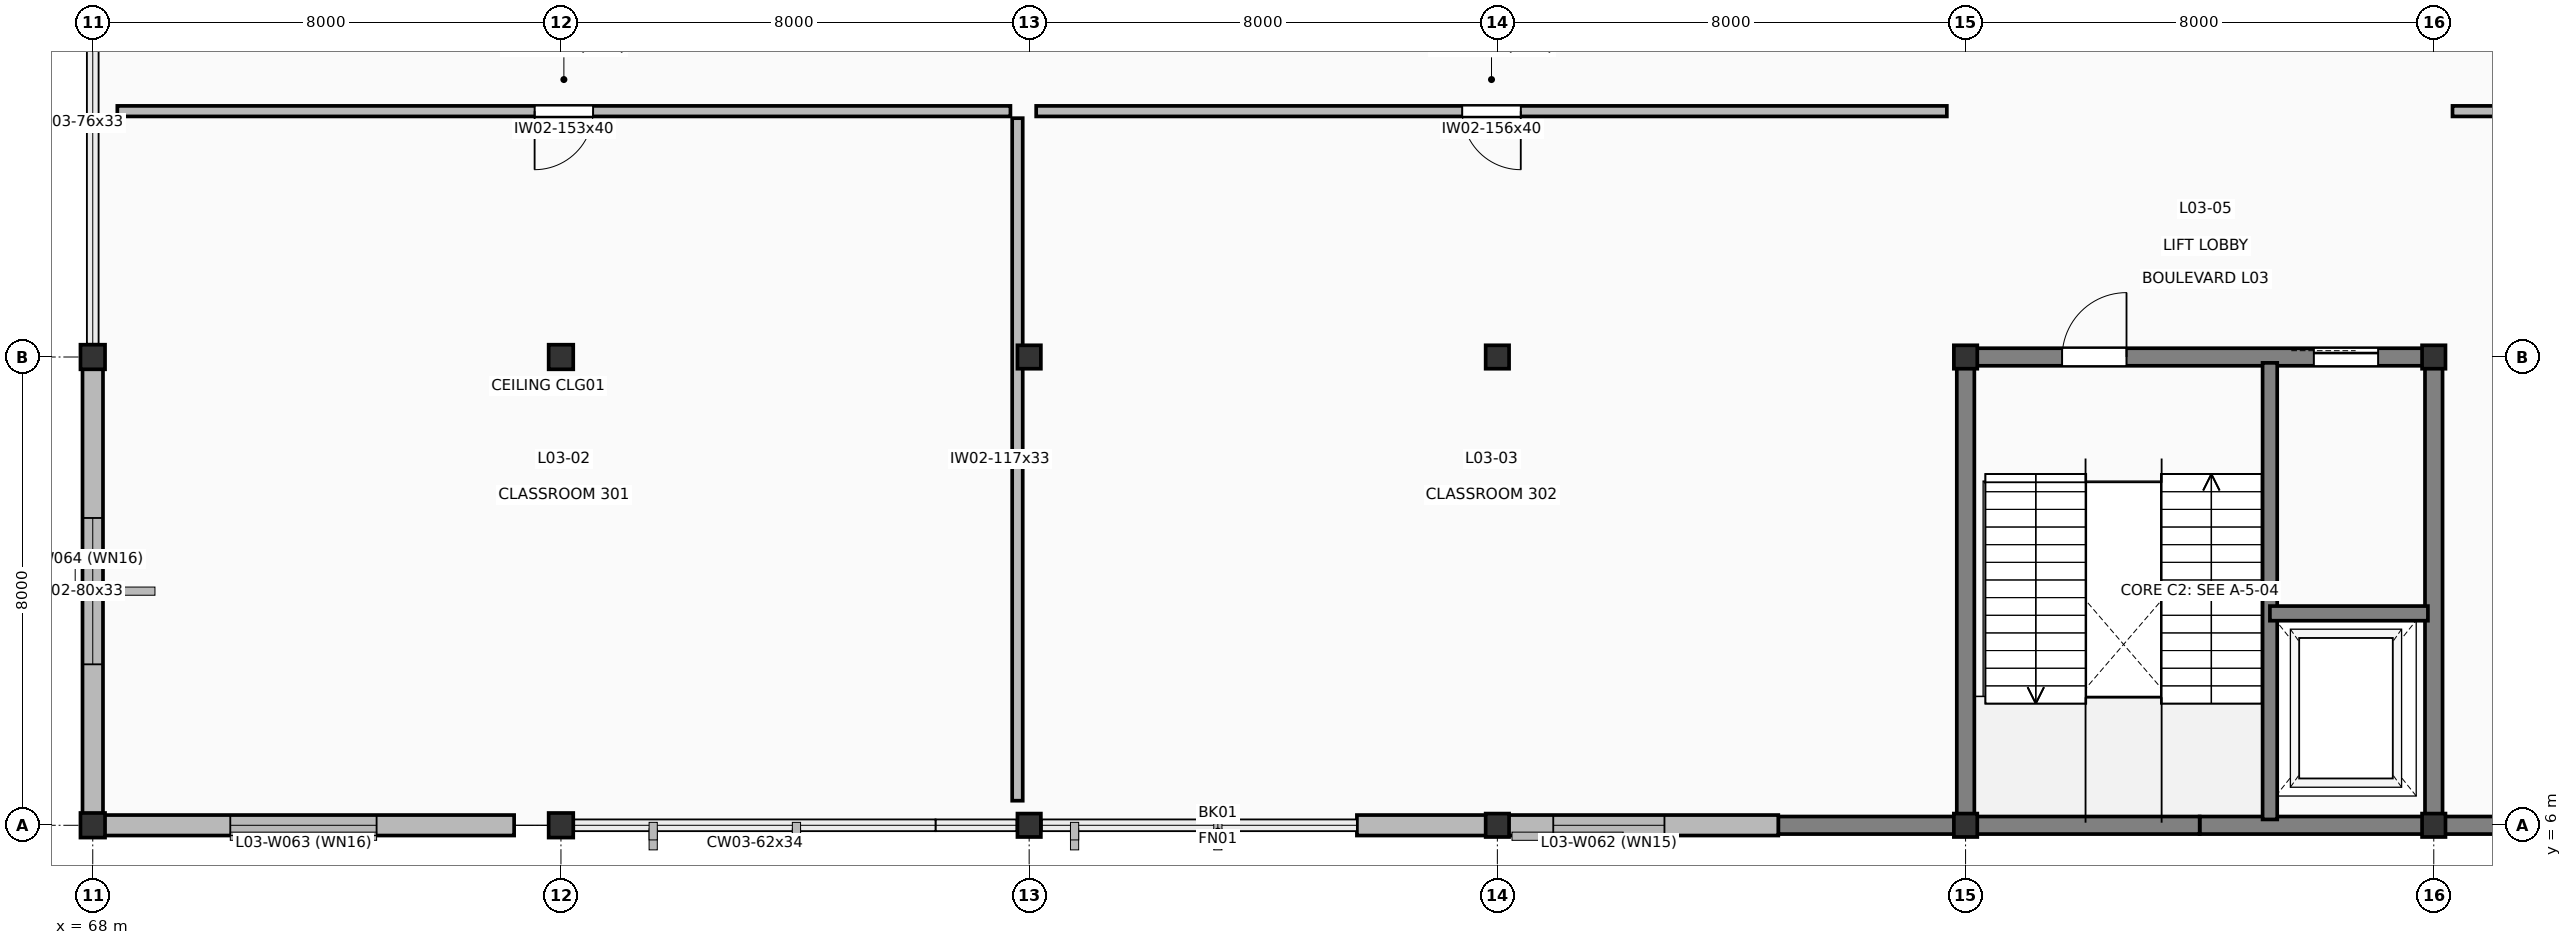
"""IFC4 building model, lengths in metres.
Left out: names, types, materials, properties, quantities, classifications, styles, units other than length and angle.
Written with IfcOpenShell. Run it as: python <this file> out.ifc"""

import sys

from ifc_helpers import new_model, si_unit, direction, frame, frame_2d, origin, origin_2d, place, context, subcontext, project, spatial, rectangle, extrude, element, fill, save


model = new_model("IFC4")
c1 = context("Model", 3, precision=1e-05, world=origin(), true_north=direction((0.0, 1.0)))
c2 = subcontext(c1, "Body", "Model", "MODEL_VIEW")
j1 = project(units=[si_unit("LENGTHUNIT", "METRE"), si_unit("PLANEANGLEUNIT", "RADIAN")], contexts=[c1])
p1 = place(None, origin())
s1 = spatial("IfcSite", under=j1, at=p1, CompositionType="ELEMENT")
p2 = place(p1, origin())
s2 = spatial("IfcBuilding", under=s1, at=p2, CompositionType="ELEMENT")
p3 = place(p2, frame((0.0, 0.0, 13.8)))
s3 = spatial("IfcBuildingStorey", under=s2, at=p3, CompositionType="ELEMENT", Elevation=13.8)
for number, where, z_axis, x_axis in (
    (1, (68.0, 6.0, 0.0), (0.0, 0.0, 1.0), (1.0, 0.0, 0.0)),
    (2, (68.0, 14.0, 0.0), (0.0, 0.0, 1.0), (1.0, 0.0, 0.0)),
    (3, (76.0, 6.0, 0.0), (0.0, 0.0, 1.0), (1.0, 0.0, 0.0)),
    (4, (76.0, 14.0, 0.0), (0.0, 0.0, 1.0), (1.0, 0.0, 0.0)),
):
    element("IfcColumn", number, at=place(p3, frame(where, z_axis=z_axis, x_axis=x_axis)), inside=s3, PredefinedType="COLUMN", context=c2, shape_type="SweptSolid", body=[
        extrude(rectangle(XDim=0.42, YDim=0.42, at=origin_2d()), origin(), (0.0, 0.0, 1.0), 4.2),
    ])
for number, where, z_axis, x_axis in (
    (5, (84.0, 6.0, 0.0), (0.0, 0.0, 1.0), (1.0, 0.0, 0.0)),
    (6, (84.0, 14.0, 0.0), (0.0, 0.0, 1.0), (1.0, 0.0, 0.0)),
    (7, (92.0, 6.0, 0.0), (0.0, 0.0, 1.0), (1.0, 0.0, 0.0)),
    (8, (92.0, 14.0, 0.0), (0.0, 0.0, 1.0), (1.0, 0.0, 0.0)),
    (9, (100.0, 6.0, 0.0), (0.0, 0.0, 1.0), (1.0, 0.0, 0.0)),
    (10, (100.0, 14.0, 0.0), (0.0, 0.0, 1.0), (1.0, 0.0, 0.0)),
    (11, (108.0, 6.0, 0.0), (0.0, 0.0, 1.0), (1.0, 0.0, 0.0)),
    (12, (108.0, 14.0, 0.0), (0.0, 0.0, 1.0), (1.0, 0.0, 0.0)),
):
    element("IfcColumn", number, at=place(p3, frame(where, z_axis=z_axis, x_axis=x_axis)), inside=s3, PredefinedType="COLUMN", context=c2, shape_type="SweptSolid", body=[
        extrude(rectangle(XDim=0.4, YDim=0.4, at=origin_2d()), origin(), (0.0, 0.0, 1.0), 4.2),
    ])
for number, where, z_axis, x_axis in (
    (13, (111.2, 6.0, 0.0), (0.0, 0.0, 1.0), (-1.0, 0.0, 0.0)),
    (14, (104.0, 6.0, 0.0), (0.0, 0.0, 1.0), (-1.0, 0.0, 0.0)),
):
    element("IfcWall", number, at=place(p3, frame(where, z_axis=z_axis, x_axis=x_axis)), inside=s3, PredefinedType="SOLIDWALL", context=c2, shape_type="SweptSolid", body=[
        extrude(rectangle(XDim=7.2, YDim=0.3, at=frame_2d((3.6, 0.0))), origin(), (0.0, 0.0, 1.0), 4.2),
    ])
p4 = place(p3, frame((96.8, 6.0, 0.0), z_axis=(0.0, 0.0, 1.0), x_axis=(-1.0, 0.0, 0.0)))
e15 = element("IfcWall", 15, at=p4, inside=s3, PredefinedType="SOLIDWALL", context=c2, shape_type="SweptSolid", body=[
    extrude(rectangle(XDim=7.2, YDim=0.35, at=frame_2d((3.6, 0.0))), origin(), (0.0, 0.0, 1.0), 3.445),
])
p5 = place(p4, frame((1.945, 0.0, 0.9)))
e16 = element("IfcOpeningElement", 16, at=p5, cuts=e15, PredefinedType="OPENING", context=c2, shape_type="SweptSolid", body=[
    extrude(rectangle(XDim=1.9, YDim=2.1, at=frame_2d((0.95, 1.05))), frame((0.0, 0.185, 0.0), z_axis=(0.0, -1.0, 0.0), x_axis=(1.0, 0.0, 0.0)), (0.0, 0.0, 1.0), 0.37),
])
p6 = place(p3, frame((75.2, 6.0, 0.0), z_axis=(0.0, 0.0, 1.0), x_axis=(-1.0, 0.0, 0.0)))
e17 = element("IfcWall", 17, at=p6, inside=s3, PredefinedType="SOLIDWALL", context=c2, shape_type="SweptSolid", body=[
    extrude(rectangle(XDim=7.2, YDim=0.35, at=frame_2d((3.6, 0.0))), origin(), (0.0, 0.0, 1.0), 3.445),
])
p7 = place(p6, frame((2.35, 0.0, 1.6)))
e18 = element("IfcOpeningElement", 18, at=p7, cuts=e17, PredefinedType="OPENING", context=c2, shape_type="SweptSolid", body=[
    extrude(rectangle(XDim=2.5, YDim=1.3, at=frame_2d((1.25, 0.65))), frame((0.0, 0.185, 0.0), z_axis=(0.0, -1.0, 0.0), x_axis=(1.0, 0.0, 0.0)), (0.0, 0.0, 1.0), 0.37),
])
p8 = place(p3, frame((68.0, 6.0, 0.0), z_axis=(0.0, 0.0, 1.0), x_axis=(0.0, 1.0, 0.0)))
e19 = element("IfcWall", 19, at=p8, inside=s3, PredefinedType="SOLIDWALL", context=c2, shape_type="SweptSolid", body=[
    extrude(rectangle(XDim=8.0, YDim=0.35, at=frame_2d((4.0, 0.0))), origin(), (0.0, 0.0, 1.0), 3.325),
])
p9 = place(p8, frame((2.75, 0.0, 1.6)))
e20 = element("IfcOpeningElement", 20, at=p9, cuts=e19, PredefinedType="OPENING", context=c2, shape_type="SweptSolid", body=[
    extrude(rectangle(XDim=2.5, YDim=1.3, at=frame_2d((1.25, 0.65))), frame((0.0, 0.185, 0.0), z_axis=(0.0, -1.0, 0.0), x_axis=(1.0, 0.0, 0.0)), (0.0, 0.0, 1.0), 0.37),
])
p10 = place(p3, frame((100.0, 6.0, 0.0), z_axis=(0.0, 0.0, 1.0), x_axis=(0.0, 1.0, 0.0)))
e21 = element("IfcWall", 21, at=p10, inside=s3, PredefinedType="SHEAR", context=c2, shape_type="SweptSolid", body=[
    extrude(rectangle(XDim=8.0, YDim=0.3, at=frame_2d((4.0, 0.0))), origin(), (0.0, 0.0, 1.0), 4.2),
])
p11 = place(p3, frame((100.0, 14.0, 0.0), z_axis=(0.0, 0.0, 1.0), x_axis=(1.0, 0.0, 0.0)))
e22 = element("IfcWall", 22, at=p11, inside=s3, PredefinedType="SHEAR", context=c2, shape_type="SweptSolid", body=[
    extrude(rectangle(XDim=8.0, YDim=0.3, at=frame_2d((4.0, 0.0))), origin(), (0.0, 0.0, 1.0), 4.2),
])
p12 = place(p11, frame((1.65, 0.0, 0.0)))
e23 = element("IfcOpeningElement", 23, at=p12, cuts=e22, PredefinedType="OPENING", context=c2, shape_type="SweptSolid", body=[
    extrude(rectangle(XDim=1.1, YDim=2.2, at=frame_2d((0.55, 1.1))), frame((0.0, 0.16, 0.0), z_axis=(0.0, -1.0, 0.0), x_axis=(1.0, 0.0, 0.0)), (0.0, 0.0, 1.0), 0.32),
])
p13 = place(p11, frame((5.95, 0.0, 0.0)))
e24 = element("IfcOpeningElement", 24, at=p13, cuts=e22, PredefinedType="OPENING", context=c2, shape_type="SweptSolid", body=[
    extrude(rectangle(XDim=1.1, YDim=2.2, at=frame_2d((0.55, 1.1))), frame((0.0, 0.16, 0.0), z_axis=(0.0, -1.0, 0.0), x_axis=(1.0, 0.0, 0.0)), (0.0, 0.0, 1.0), 0.32),
])
p14 = place(p3, frame((108.0, 14.0, 0.0), z_axis=(0.0, 0.0, 1.0), x_axis=(0.0, -1.0, 0.0)))
e25 = element("IfcWall", 25, at=p14, inside=s3, PredefinedType="SHEAR", context=c2, shape_type="SweptSolid", body=[
    extrude(rectangle(XDim=8.0, YDim=0.3, at=frame_2d((4.0, 0.0))), origin(), (0.0, 0.0, 1.0), 4.2),
])
p15 = place(p3, frame((105.2, 6.1, 0.0), z_axis=(0.0, 0.0, 1.0), x_axis=(0.0, 1.0, 0.0)))
e26 = element("IfcWall", 26, at=p15, inside=s3, PredefinedType="SHEAR", context=c2, shape_type="SweptSolid", body=[
    extrude(rectangle(XDim=7.8, YDim=0.25, at=frame_2d((3.9, 0.0))), origin(), (0.0, 0.0, 1.0), 4.2),
])
p16 = place(p3, frame((105.2, 9.62, 0.0), z_axis=(0.0, 0.0, 1.0), x_axis=(1.0, 0.0, 0.0)))
e27 = element("IfcWall", 27, at=p16, inside=s3, PredefinedType="SHEAR", context=c2, shape_type="SweptSolid", body=[
    extrude(rectangle(XDim=2.7, YDim=0.25, at=frame_2d((1.35, 0.0))), origin(), (0.0, 0.0, 1.0), 4.2),
])
p17 = place(p3, frame((83.68, 18.2, 0.0), z_axis=(0.0, 0.0, 1.0), x_axis=(-1.0, 0.0, 0.0)))
e28 = element("IfcWall", 28, at=p17, inside=s3, PredefinedType="PARTITIONING", context=c2, shape_type="SweptSolid", body=[
    extrude(rectangle(XDim=15.26, YDim=0.18, at=frame_2d((7.63, 0.0))), origin(), (0.0, 0.0, 1.0), 3.98),
])
p18 = place(p17, frame((7.13, 0.0, 0.0)))
e29 = element("IfcOpeningElement", 29, at=p18, cuts=e28, PredefinedType="OPENING", context=c2, shape_type="SweptSolid", body=[
    extrude(rectangle(XDim=1.0, YDim=2.15, at=frame_2d((0.5, 1.075))), frame((0.0, 0.1, 0.0), z_axis=(0.0, -1.0, 0.0), x_axis=(1.0, 0.0, 0.0)), (0.0, 0.0, 1.0), 0.2),
])
p19 = place(p3, frame((83.8, 6.42, 0.0), z_axis=(0.0, 0.0, 1.0), x_axis=(0.0, 1.0, 0.0)))
e30 = element("IfcWall", 30, at=p19, inside=s3, PredefinedType="PARTITIONING", context=c2, shape_type="SweptSolid", body=[
    extrude(rectangle(XDim=11.66, YDim=0.18, at=frame_2d((5.83, 0.0))), origin(), (0.0, 0.0, 1.0), 3.325),
])
p20 = place(p3, frame((99.68, 18.2, 0.0), z_axis=(0.0, 0.0, 1.0), x_axis=(-1.0, 0.0, 0.0)))
e31 = element("IfcWall", 31, at=p20, inside=s3, PredefinedType="PARTITIONING", context=c2, shape_type="SweptSolid", body=[
    extrude(rectangle(XDim=15.56, YDim=0.18, at=frame_2d((7.78, 0.0))), origin(), (0.0, 0.0, 1.0), 3.98),
])
p21 = place(p20, frame((7.28, 0.0, 0.0)))
e32 = element("IfcOpeningElement", 32, at=p21, cuts=e31, PredefinedType="OPENING", context=c2, shape_type="SweptSolid", body=[
    extrude(rectangle(XDim=1.0, YDim=2.15, at=frame_2d((0.5, 1.075))), frame((0.0, 0.1, 0.0), z_axis=(0.0, -1.0, 0.0), x_axis=(1.0, 0.0, 0.0)), (0.0, 0.0, 1.0), 0.2),
])
p22 = place(p3, frame((123.68, 18.2, 0.0), z_axis=(0.0, 0.0, 1.0), x_axis=(-1.0, 0.0, 0.0)))
e33 = element("IfcWall", 33, at=p22, inside=s3, PredefinedType="PARTITIONING", context=c2, shape_type="SweptSolid", body=[
    extrude(rectangle(XDim=15.36, YDim=0.18, at=frame_2d((7.68, 0.0))), origin(), (0.0, 0.0, 1.0), 3.98),
])
p23 = place(p22, frame((7.18, 0.0, 0.0)))
e34 = element("IfcOpeningElement", 34, at=p23, cuts=e33, PredefinedType="OPENING", context=c2, shape_type="SweptSolid", body=[
    extrude(rectangle(XDim=1.0, YDim=2.15, at=frame_2d((0.5, 1.075))), frame((0.0, 0.1, 0.0), z_axis=(0.0, -1.0, 0.0), x_axis=(1.0, 0.0, 0.0)), (0.0, 0.0, 1.0), 0.2),
])
p24 = place(p5, origin())
e35 = element("IfcWindow", 35, at=p24, inside=s3, PartitioningType="DOUBLE_PANEL_VERTICAL", PredefinedType="WINDOW", context=c2, shape_type="SweptSolid", body=[
    extrude(rectangle(XDim=1.9, YDim=2.1, at=frame_2d((0.95, 1.05))), frame((0.0, 0.03, 0.0), z_axis=(0.0, -1.0, 0.0), x_axis=(1.0, 0.0, 0.0)), (0.0, 0.0, 1.0), 0.06),
])
fill(e16, e35)
p25 = place(p7, origin())
e36 = element("IfcWindow", 36, at=p25, inside=s3, PartitioningType="DOUBLE_PANEL_VERTICAL", PredefinedType="WINDOW", context=c2, shape_type="SweptSolid", body=[
    extrude(rectangle(XDim=2.5, YDim=1.3, at=frame_2d((1.25, 0.65))), frame((0.0, 0.03, 0.0), z_axis=(0.0, -1.0, 0.0), x_axis=(1.0, 0.0, 0.0)), (0.0, 0.0, 1.0), 0.06),
])
fill(e18, e36)
p26 = place(p9, origin())
e37 = element("IfcWindow", 37, at=p26, inside=s3, PartitioningType="DOUBLE_PANEL_VERTICAL", PredefinedType="WINDOW", context=c2, shape_type="SweptSolid", body=[
    extrude(rectangle(XDim=2.5, YDim=1.3, at=frame_2d((1.25, 0.65))), frame((0.0, 0.03, 0.0), z_axis=(0.0, -1.0, 0.0), x_axis=(1.0, 0.0, 0.0)), (0.0, 0.0, 1.0), 0.06),
])
fill(e20, e37)
p27 = place(p12, origin())
e38 = element("IfcDoor", 38, at=p27, inside=s3, OperationType="SINGLE_SWING_RIGHT", PredefinedType="DOOR", context=c2, shape_type="SweptSolid", body=[
    extrude(rectangle(XDim=1.1, YDim=2.2, at=frame_2d((0.55, 1.1))), frame((0.0, 0.025, 0.0), z_axis=(0.0, -1.0, 0.0), x_axis=(1.0, 0.0, 0.0)), (0.0, 0.0, 1.0), 0.05),
])
fill(e23, e38)
p28 = place(p13, origin())
e39 = element("IfcDoor", 39, at=p28, inside=s3, OperationType="SLIDING_TO_LEFT", PredefinedType="DOOR", context=c2, shape_type="SweptSolid", body=[
    extrude(rectangle(XDim=1.1, YDim=2.2, at=frame_2d((0.55, 1.1))), frame((0.0, 0.025, 0.0), z_axis=(0.0, -1.0, 0.0), x_axis=(1.0, 0.0, 0.0)), (0.0, 0.0, 1.0), 0.05),
])
fill(e24, e39)
p29 = place(p18, origin())
e40 = element("IfcDoor", 40, at=p29, inside=s3, OperationType="SINGLE_SWING_RIGHT", PredefinedType="DOOR", context=c2, shape_type="SweptSolid", body=[
    extrude(rectangle(XDim=1.0, YDim=2.15, at=frame_2d((0.5, 1.075))), frame((0.0, 0.025, 0.0), z_axis=(0.0, -1.0, 0.0), x_axis=(1.0, 0.0, 0.0)), (0.0, 0.0, 1.0), 0.05),
])
fill(e29, e40)
p30 = place(p21, origin())
e41 = element("IfcDoor", 41, at=p30, inside=s3, OperationType="SINGLE_SWING_LEFT", PredefinedType="DOOR", context=c2, shape_type="SweptSolid", body=[
    extrude(rectangle(XDim=1.0, YDim=2.15, at=frame_2d((0.5, 1.075))), frame((0.0, 0.025, 0.0), z_axis=(0.0, -1.0, 0.0), x_axis=(1.0, 0.0, 0.0)), (0.0, 0.0, 1.0), 0.05),
])
fill(e32, e41)
save(model, sys.argv[1])
